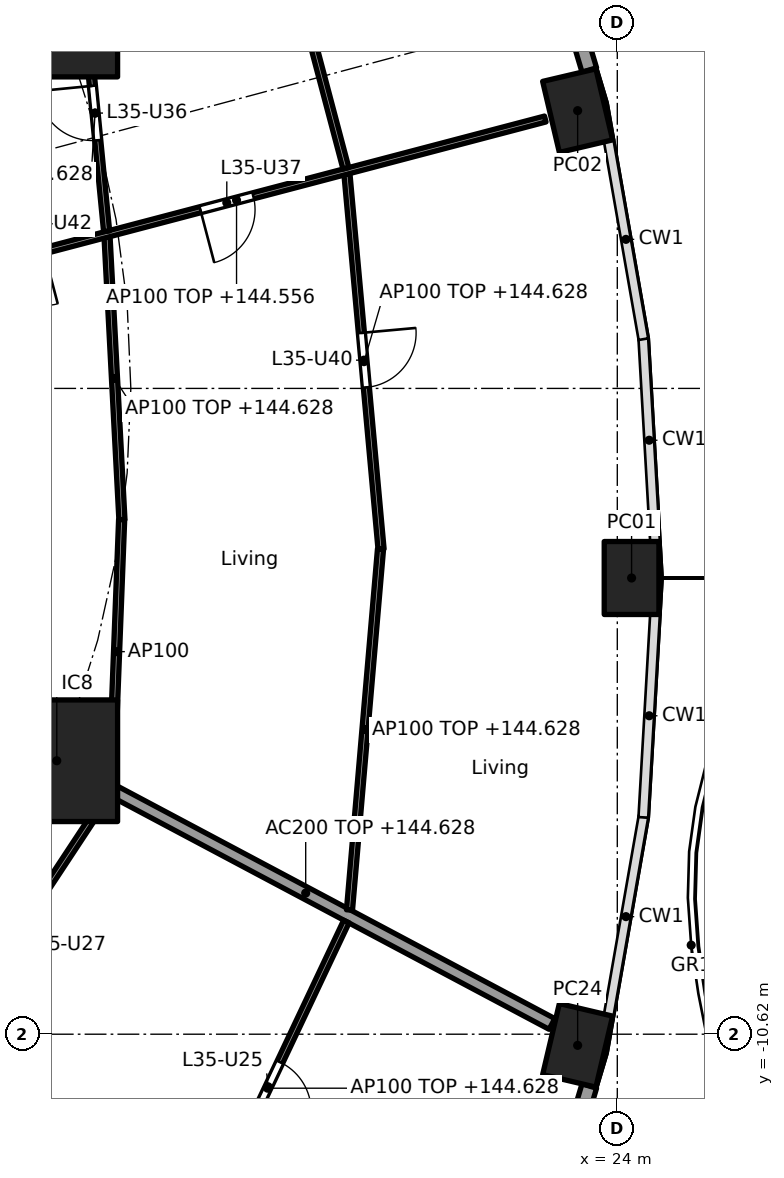
"""IFC4 building model, lengths in metres.
Left out: names, types, materials, properties, quantities, classifications, styles, units other than length and angle.
Written with IfcOpenShell. Run it as: python <this file> out.ifc"""

import sys

from ifc_helpers import new_model, si_unit, direction, frame, frame_2d, origin, origin_2d, place, context, subcontext, project, spatial, rectangle, hollow_rectangle, extrude, element, fill, save


model = new_model("IFC4")
c1 = context("Model", 3, precision=1e-05, world=origin(), true_north=direction((0.0, 1.0)))
c2 = subcontext(c1, "Body", "Model", "MODEL_VIEW")
j1 = project(units=[si_unit("LENGTHUNIT", "METRE"), si_unit("PLANEANGLEUNIT", "RADIAN")], contexts=[c1])
p1 = place(None, origin())
s1 = spatial("IfcSite", under=j1, at=p1, CompositionType="ELEMENT")
p2 = place(p1, origin())
s2 = spatial("IfcBuilding", under=s1, at=p2, CompositionType="ELEMENT")
p3 = place(p2, frame((0.0, 0.0, 141.8)))
s3 = spatial("IfcBuildingStorey", under=s2, at=p3, CompositionType="ELEMENT", Elevation=141.8)
for number, where, z_axis, x_axis in (
    (1, (24.235, -3.118, 0.0), (0.0, 0.0, 1.0), (0.0, 1.0, 0.0)),
    (2, (23.348, 4.568, 0.0), (0.0, 0.0, 1.0), (-0.229, 0.973, 0.0)),
    (3, (23.348, -10.803, 0.0), (0.0, 0.0, 1.0), (0.229, 0.973, 0.0)),
):
    element("IfcColumn", number, at=place(p3, frame(where, z_axis=z_axis, x_axis=x_axis)), inside=s3, PredefinedType="COLUMN", context=c2, shape_type="SweptSolid", body=[
        extrude(hollow_rectangle(XDim=1.2, YDim=0.9, WallThickness=0.04, at=origin_2d()), origin(), (0.0, 0.0, 1.0), 3.7),
    ])
for number, where, z_axis, x_axis in (
    (4, (14.782, 6.123, 0.0), (0.0, 0.0, 1.0), (1.0, 0.0, 0.0)),
    (5, (14.782, -6.123, 0.0), (0.0, 0.0, 1.0), (1.0, 0.0, 0.0)),
):
    element("IfcColumn", number, at=place(p3, frame(where, z_axis=z_axis, x_axis=x_axis)), inside=s3, PredefinedType="COLUMN", context=c2, shape_type="SweptSolid", body=[
        extrude(rectangle(XDim=2.0, YDim=2.0, at=origin_2d()), origin(), (0.0, 0.0, 1.0), 3.7),
    ])
p4 = place(p3, frame((22.595, 8.402, 0.0), z_axis=(0.0, 0.0, 1.0), x_axis=(0.285842038783, -0.958276749621, 0.0)))
e6 = element("IfcWall", 6, at=p4, inside=s3, PredefinedType="SOLIDWALL", context=c2, shape_type="SweptSolid", body=[
    extrude(rectangle(XDim=3.303, YDim=0.25, at=frame_2d((1.651, 0.0))), origin(), (0.0, 0.0, 1.0), 3.44),
])
p5 = place(p4, frame((0.602, 0.0, 0.0)))
e7 = element("IfcOpeningElement", 7, at=p5, cuts=e6, PredefinedType="OPENING", context=c2, shape_type="SweptSolid", body=[
    extrude(rectangle(XDim=2.1, YDim=2.4, at=frame_2d((1.05, 1.2))), frame((0.0, 0.135, 0.0), z_axis=(0.0, -1.0, 0.0), x_axis=(1.0, 0.0, 0.0)), (0.0, 0.0, 1.0), 0.27),
])
p6 = place(p3, frame((23.54, -11.472, 0.0), z_axis=(0.0, 0.0, 1.0), x_axis=(-0.285821792767, -0.958282788523, 0.0)))
e8 = element("IfcWall", 8, at=p6, inside=s3, PredefinedType="SOLIDWALL", context=c2, shape_type="SweptSolid", body=[
    extrude(rectangle(XDim=3.303, YDim=0.25, at=frame_2d((1.651, 0.0))), origin(), (0.0, 0.0, 1.0), 3.44),
])
p7 = place(p6, frame((0.602, 0.0, 0.0)))
e9 = element("IfcOpeningElement", 9, at=p7, cuts=e8, PredefinedType="OPENING", context=c2, shape_type="SweptSolid", body=[
    extrude(rectangle(XDim=2.1, YDim=2.4, at=frame_2d((1.05, 1.2))), frame((0.0, 0.135, 0.0), z_axis=(0.0, -1.0, 0.0), x_axis=(1.0, 0.0, 0.0)), (0.0, 0.0, 1.0), 0.27),
])
p8 = place(p3, frame((12.657, -5.243, 0.0), z_axis=(0.0, 0.0, 1.0), x_axis=(0.923846436004, -0.382763324632, 0.0)))
e10 = element("IfcWall", 10, at=p8, inside=s3, PredefinedType="PARTITIONING", context=c2, shape_type="SweptSolid", body=[
    extrude(rectangle(XDim=2.2, YDim=0.2, at=frame_2d((1.1, 0.0))), origin(), (0.0, 0.0, 1.0), 3.44),
])
p9 = place(p3, frame((14.826, -6.146, 0.0), z_axis=(0.0, 0.0, 1.0), x_axis=(0.883012998471, -0.469348532044, 0.0)))
e11 = element("IfcWall", 11, at=p9, inside=s3, PredefinedType="PARTITIONING", context=c2, shape_type="SweptSolid", body=[
    extrude(rectangle(XDim=9.172, YDim=0.2, at=frame_2d((4.586, 0.0))), origin(), (0.0, 0.0, 1.0), 2.828),
])
p10 = place(p3, frame((15.853, -2.158, 0.0), z_axis=(0.0, 0.0, 1.0), x_axis=(-0.052509224895, 0.998620439056, 0.0)))
e12 = element("IfcWall", 12, at=p10, inside=s3, PredefinedType="PARTITIONING", context=c2, shape_type="SweptSolid", body=[
    extrude(rectangle(XDim=4.649, YDim=0.1, at=frame_2d((2.325, 0.0))), origin(), (0.0, 0.0, 1.0), 2.828),
])
p11 = place(p3, frame((15.849, -2.158, 0.0), z_axis=(0.0, 0.0, 1.0), x_axis=(-0.03838348155, -0.999263082648, 0.0)))
e13 = element("IfcWall", 13, at=p11, inside=s3, PredefinedType="PARTITIONING", context=c2, shape_type="SweptSolid", body=[
    extrude(rectangle(XDim=4.344, YDim=0.1, at=frame_2d((2.172, 0.0))), origin(), (0.0, 0.0, 1.0), 3.44),
])
p12 = place(p3, frame((20.115, -2.642, 0.0), z_axis=(0.0, 0.0, 1.0), x_axis=(-0.090567755363, 0.995890296011, 0.0)))
e14 = element("IfcWall", 14, at=p12, inside=s3, PredefinedType="PARTITIONING", context=c2, shape_type="SweptSolid", body=[
    extrude(rectangle(XDim=6.189, YDim=0.1, at=frame_2d((3.095, 0.0))), origin(), (0.0, 0.0, 1.0), 2.828),
])
p13 = place(p12, frame((2.67, 0.0, 0.0)))
e15 = element("IfcOpeningElement", 15, at=p13, cuts=e14, PredefinedType="OPENING", context=c2, shape_type="SweptSolid", body=[
    extrude(rectangle(XDim=0.9, YDim=2.1, at=frame_2d((0.45, 1.05))), frame((0.0, 0.06, 0.0), z_axis=(0.0, -1.0, 0.0), x_axis=(1.0, 0.0, 0.0)), (0.0, 0.0, 1.0), 0.12),
])
p14 = place(p3, frame((20.106, -2.642, 0.0), z_axis=(0.0, 0.0, 1.0), x_axis=(-0.085694058383, -0.996321498492, 0.0)))
e16 = element("IfcWall", 16, at=p14, inside=s3, PredefinedType="PARTITIONING", context=c2, shape_type="SweptSolid", body=[
    extrude(rectangle(XDim=5.957, YDim=0.1, at=frame_2d((2.979, 0.0))), origin(), (0.0, 0.0, 1.0), 2.828),
])
p15 = place(p3, frame((12.661, 1.76, 0.0), z_axis=(0.0, 0.0, 1.0), x_axis=(0.967120304949, 0.254319318488, 0.0)))
e17 = element("IfcWall", 17, at=p15, inside=s3, PredefinedType="PARTITIONING", context=c2, shape_type="SweptSolid", body=[
    extrude(rectangle(XDim=10.499, YDim=0.1, at=frame_2d((5.25, 0.0))), origin(), (0.0, 0.0, 1.0), 2.756),
])
p16 = place(p15, frame((4.634, 0.0, 0.0)))
e18 = element("IfcOpeningElement", 18, at=p16, cuts=e17, PredefinedType="OPENING", context=c2, shape_type="SweptSolid", body=[
    extrude(rectangle(XDim=0.9, YDim=2.1, at=frame_2d((0.45, 1.05))), frame((0.0, 0.06, 0.0), z_axis=(0.0, -1.0, 0.0), x_axis=(1.0, 0.0, 0.0)), (0.0, 0.0, 1.0), 0.12),
])
p17 = place(p15, frame((1.073, 0.0, 0.0)))
e19 = element("IfcOpeningElement", 19, at=p17, cuts=e17, PredefinedType="OPENING", context=c2, shape_type="SweptSolid", body=[
    extrude(rectangle(XDim=0.9, YDim=2.1, at=frame_2d((0.45, 1.05))), frame((0.0, 0.06, 0.0), z_axis=(0.0, -1.0, 0.0), x_axis=(1.0, 0.0, 0.0)), (0.0, 0.0, 1.0), 0.12),
])
p18 = place(p3, frame((15.602, 2.584, 0.0), z_axis=(0.0, 0.0, 1.0), x_axis=(-0.097207196705, 0.995264166394, 0.0)))
e20 = element("IfcWall", 20, at=p18, inside=s3, PredefinedType="PARTITIONING", context=c2, shape_type="SweptSolid", body=[
    extrude(rectangle(XDim=3.906, YDim=0.1, at=frame_2d((1.953, 0.0))), origin(), (0.0, 0.0, 1.0), 2.828),
])
p19 = place(p18, frame((1.503, 0.0, 0.0)))
e21 = element("IfcOpeningElement", 21, at=p19, cuts=e20, PredefinedType="OPENING", context=c2, shape_type="SweptSolid", body=[
    extrude(rectangle(XDim=0.9, YDim=2.1, at=frame_2d((0.45, 1.05))), frame((0.0, 0.06, 0.0), z_axis=(0.0, -1.0, 0.0), x_axis=(1.0, 0.0, 0.0)), (0.0, 0.0, 1.0), 0.12),
])
p20 = place(p3, frame((19.537, 3.62, 0.0), z_axis=(0.0, 0.0, 1.0), x_axis=(-0.255892560316, 0.966705227862, 0.0)))
e22 = element("IfcWall", 22, at=p20, inside=s3, PredefinedType="PARTITIONING", context=c2, shape_type="SweptSolid", body=[
    extrude(rectangle(XDim=5.659, YDim=0.1, at=frame_2d((2.829, 0.0))), origin(), (0.0, 0.0, 1.0), 2.828),
])
p21 = place(p20, frame((2.379, 0.0, 0.0)))
e23 = element("IfcOpeningElement", 23, at=p21, cuts=e22, PredefinedType="OPENING", context=c2, shape_type="SweptSolid", body=[
    extrude(rectangle(XDim=0.9, YDim=2.1, at=frame_2d((0.45, 1.05))), frame((0.0, 0.06, 0.0), z_axis=(0.0, -1.0, 0.0), x_axis=(1.0, 0.0, 0.0)), (0.0, 0.0, 1.0), 0.12),
])
p22 = place(p3, frame((12.657, 5.243, 0.0), z_axis=(0.0, 0.0, 1.0), x_axis=(0.923864733477, 0.382719158442, 0.0)))
e24 = element("IfcWall", 24, at=p22, inside=s3, PredefinedType="PARTITIONING", context=c2, shape_type="SweptSolid", body=[
    extrude(rectangle(XDim=2.25, YDim=0.1, at=frame_2d((1.125, 0.0))), origin(), (0.0, 0.0, 1.0), 3.44),
])
p23 = place(p3, frame((13.072, -10.55, 0.0), z_axis=(0.0, 0.0, 1.0), x_axis=(0.550607247415, 0.834764433295, 0.0)))
e25 = element("IfcWall", 25, at=p23, inside=s3, PredefinedType="PARTITIONING", context=c2, shape_type="SweptSolid", body=[
    extrude(rectangle(XDim=4.633, YDim=0.1, at=frame_2d((2.316, 0.0))), origin(), (0.0, 0.0, 1.0), 2.828),
])
p24 = place(p23, frame((1.891, 0.0, 0.0)))
e26 = element("IfcOpeningElement", 26, at=p24, cuts=e25, PredefinedType="OPENING", context=c2, shape_type="SweptSolid", body=[
    extrude(rectangle(XDim=0.9, YDim=2.1, at=frame_2d((0.45, 1.05))), frame((0.0, 0.06, 0.0), z_axis=(0.0, -1.0, 0.0), x_axis=(1.0, 0.0, 0.0)), (0.0, 0.0, 1.0), 0.12),
])
p25 = place(p3, frame((16.953, -14.249, 0.0), z_axis=(0.0, 0.0, 1.0), x_axis=(0.427438858397, 0.904044259056, 0.0)))
e27 = element("IfcWall", 27, at=p25, inside=s3, PredefinedType="PARTITIONING", context=c2, shape_type="SweptSolid", body=[
    extrude(rectangle(XDim=6.063, YDim=0.1, at=frame_2d((3.031, 0.0))), origin(), (0.0, 0.0, 1.0), 2.828),
])
p26 = place(p25, frame((2.607, 0.0, 0.0)))
e28 = element("IfcOpeningElement", 28, at=p26, cuts=e27, PredefinedType="OPENING", context=c2, shape_type="SweptSolid", body=[
    extrude(rectangle(XDim=0.9, YDim=2.1, at=frame_2d((0.45, 1.05))), frame((0.0, 0.06, 0.0), z_axis=(0.0, -1.0, 0.0), x_axis=(1.0, 0.0, 0.0)), (0.0, 0.0, 1.0), 0.12),
])
p27 = place(p26, frame((0.9, 0.0, 0.0), x_axis=(-1.0, 0.0, 0.0)))
e29 = element("IfcDoor", 29, at=p27, inside=s3, OperationType="SINGLE_SWING_RIGHT", PredefinedType="DOOR", context=c2, shape_type="SweptSolid", body=[
    extrude(rectangle(XDim=0.9, YDim=2.1, at=frame_2d((0.45, 1.05))), frame((0.0, 0.025, 0.0), z_axis=(0.0, -1.0, 0.0), x_axis=(1.0, 0.0, 0.0)), (0.0, 0.0, 1.0), 0.05),
])
fill(e28, e29)
p28 = place(p19, origin())
e30 = element("IfcDoor", 30, at=p28, inside=s3, OperationType="SINGLE_SWING_RIGHT", PredefinedType="DOOR", context=c2, shape_type="SweptSolid", body=[
    extrude(rectangle(XDim=0.9, YDim=2.1, at=frame_2d((0.45, 1.05))), frame((0.0, 0.025, 0.0), z_axis=(0.0, -1.0, 0.0), x_axis=(1.0, 0.0, 0.0)), (0.0, 0.0, 1.0), 0.05),
])
fill(e21, e30)
p29 = place(p16, frame((0.9, 0.0, 0.0), x_axis=(-1.0, 0.0, 0.0)))
e31 = element("IfcDoor", 31, at=p29, inside=s3, OperationType="SINGLE_SWING_RIGHT", PredefinedType="DOOR", context=c2, shape_type="SweptSolid", body=[
    extrude(rectangle(XDim=0.9, YDim=2.1, at=frame_2d((0.45, 1.05))), frame((0.0, 0.025, 0.0), z_axis=(0.0, -1.0, 0.0), x_axis=(1.0, 0.0, 0.0)), (0.0, 0.0, 1.0), 0.05),
])
fill(e18, e31)
p30 = place(p13, frame((0.9, 0.0, 0.0), x_axis=(-1.0, 0.0, 0.0)))
e32 = element("IfcDoor", 32, at=p30, inside=s3, OperationType="SINGLE_SWING_LEFT", PredefinedType="DOOR", context=c2, shape_type="SweptSolid", body=[
    extrude(rectangle(XDim=0.9, YDim=2.1, at=frame_2d((0.45, 1.05))), frame((0.0, 0.025, 0.0), z_axis=(0.0, -1.0, 0.0), x_axis=(1.0, 0.0, 0.0)), (0.0, 0.0, 1.0), 0.05),
])
fill(e15, e32)
save(model, sys.argv[1])
